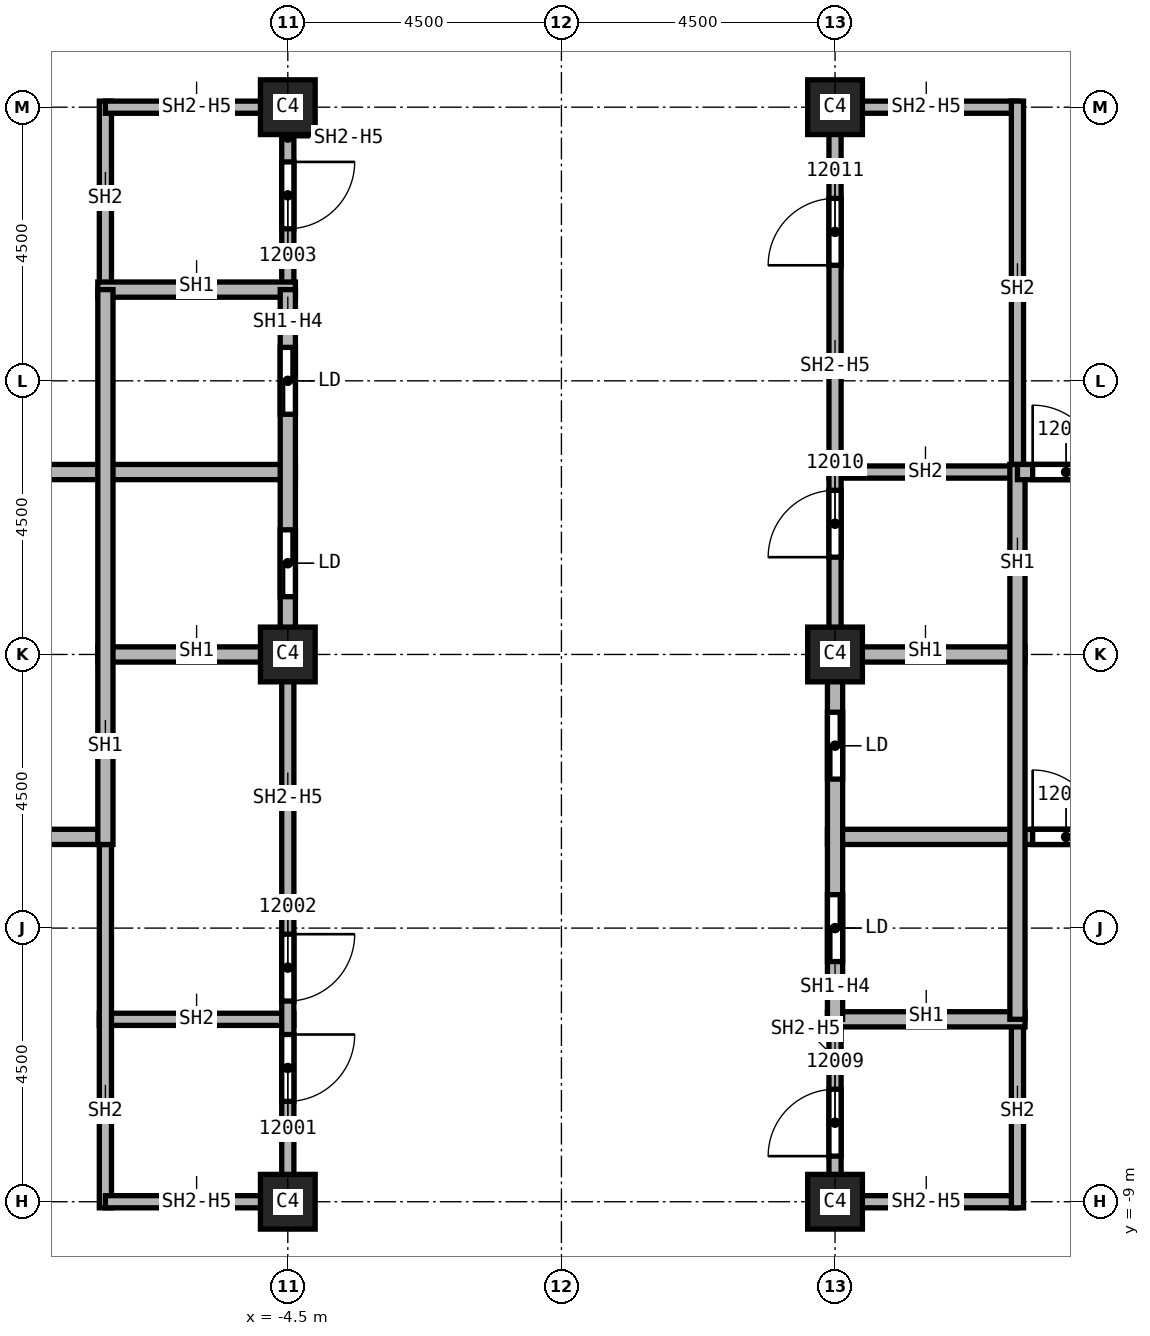
"""IFC4 building model, lengths in metres.
Left out: names, types, materials, properties, quantities, classifications, styles, units other than length and angle.
Written with IfcOpenShell. Run it as: python <this file> out.ifc"""

import sys

from ifc_helpers import new_model, si_unit, direction, frame, frame_2d, origin, origin_2d, place, context, subcontext, project, spatial, rectangle, extrude, element, fill, save


model = new_model("IFC4")
c1 = context("Model", 3, precision=1e-05, world=origin(), true_north=direction((0.0, 1.0)))
c2 = subcontext(c1, "Body", "Model", "MODEL_VIEW")
j1 = project(units=[si_unit("LENGTHUNIT", "METRE"), si_unit("PLANEANGLEUNIT", "RADIAN")], contexts=[c1])
p1 = place(None, origin())
s1 = spatial("IfcSite", under=j1, at=p1, CompositionType="ELEMENT")
p2 = place(p1, origin())
s2 = spatial("IfcBuilding", under=s1, at=p2, CompositionType="ELEMENT")
p3 = place(p2, frame((0.0, 0.0, 196.0)))
s3 = spatial("IfcBuildingStorey", under=s2, at=p3, CompositionType="ELEMENT", Elevation=196.0)
for number, where, z_axis, x_axis in (
    (1, (4.5, 0.0, 0.0), (0.0, 0.0, 1.0), (1.0, 0.0, 0.0)),
    (2, (4.5, 9.0, 0.0), (0.0, 0.0, 1.0), (1.0, 0.0, 0.0)),
    (3, (4.5, -9.0, 0.0), (0.0, 0.0, 1.0), (1.0, 0.0, 0.0)),
    (4, (-4.5, 0.0, 0.0), (0.0, 0.0, 1.0), (1.0, 0.0, 0.0)),
    (5, (-4.5, 9.0, 0.0), (0.0, 0.0, 1.0), (1.0, 0.0, 0.0)),
    (6, (-4.5, -9.0, 0.0), (0.0, 0.0, 1.0), (1.0, 0.0, 0.0)),
):
    element("IfcColumn", number, at=place(p3, frame(where, z_axis=z_axis, x_axis=x_axis)), inside=s3, PredefinedType="COLUMN", context=c2, shape_type="SweptSolid", body=[
        extrude(rectangle(XDim=0.9, YDim=0.9, at=origin_2d()), origin(), (0.0, 0.0, 1.0), 3.72),
    ])
p4 = place(p3, frame((-7.6, -6.0, 0.0), z_axis=(0.0, 0.0, 1.0), x_axis=(1.0, 0.0, 0.0)))
e7 = element("IfcWall", 7, at=p4, inside=s3, PredefinedType="SOLIDWALL", context=c2, shape_type="SweptSolid", body=[
    extrude(rectangle(XDim=3.2, YDim=0.2, at=frame_2d((1.6, 0.0))), origin(), (0.0, 0.0, 1.0), 3.72),
])
p5 = place(p3, frame((-7.5, -9.1, 0.0), z_axis=(0.0, 0.0, 1.0), x_axis=(0.0, 1.0, 0.0)))
e8 = element("IfcWall", 8, at=p5, inside=s3, PredefinedType="SOLIDWALL", context=c2, shape_type="SweptSolid", body=[
    extrude(rectangle(XDim=6.225, YDim=0.2, at=frame_2d((3.113, 0.0))), origin(), (0.0, 0.0, 1.0), 3.72),
])
p6 = place(p3, frame((-7.5, 6.0, 0.0), z_axis=(0.0, 0.0, 1.0), x_axis=(0.0, 1.0, 0.0)))
e9 = element("IfcWall", 9, at=p6, inside=s3, PredefinedType="SOLIDWALL", context=c2, shape_type="SweptSolid", body=[
    extrude(rectangle(XDim=3.1, YDim=0.2, at=frame_2d((1.55, 0.0))), origin(), (0.0, 0.0, 1.0), 3.72),
])
for number, where, z_axis, x_axis in (
    (10, (-7.5, 9.0, 0.0), (0.0, 0.0, 1.0), (1.0, 0.0, 0.0)),
    (11, (-4.5, -9.0, 0.0), (0.0, 0.0, 1.0), (-1.0, 0.0, 0.0)),
):
    element("IfcWall", number, at=place(p3, frame(where, z_axis=z_axis, x_axis=x_axis)), inside=s3, PredefinedType="SOLIDWALL", context=c2, shape_type="SweptSolid", body=[
        extrude(rectangle(XDim=3.0, YDim=0.2, at=frame_2d((1.5, 0.0))), origin(), (0.0, 0.0, 1.0), 2.958),
    ])
p7 = place(p3, frame((-4.5, 0.0, 0.0), z_axis=(0.0, 0.0, 1.0), x_axis=(0.0, -1.0, 0.0)))
e12 = element("IfcWall", 12, at=p7, inside=s3, PredefinedType="SOLIDWALL", context=c2, shape_type="SweptSolid", body=[
    extrude(rectangle(XDim=9.1, YDim=0.2, at=frame_2d((4.55, 0.0))), origin(), (0.0, 0.0, 1.0), 2.958),
])
p8 = place(p7, frame((6.25, 0.0, 0.0)))
e13 = element("IfcOpeningElement", 13, at=p8, cuts=e12, PredefinedType="OPENING", context=c2, shape_type="SweptSolid", body=[
    extrude(rectangle(XDim=1.1, YDim=2.1, at=frame_2d((0.55, 1.05))), frame((0.0, 0.1, 0.0), z_axis=(0.0, -1.0, 0.0), x_axis=(1.0, 0.0, 0.0)), (0.0, 0.0, 1.0), 0.2),
])
p9 = place(p7, frame((4.6, 0.0, 0.0)))
e14 = element("IfcOpeningElement", 14, at=p9, cuts=e12, PredefinedType="OPENING", context=c2, shape_type="SweptSolid", body=[
    extrude(rectangle(XDim=1.1, YDim=2.1, at=frame_2d((0.55, 1.05))), frame((0.0, 0.1, 0.0), z_axis=(0.0, -1.0, 0.0), x_axis=(1.0, 0.0, 0.0)), (0.0, 0.0, 1.0), 0.2),
])
p10 = place(p3, frame((-4.5, 9.1, 0.0), z_axis=(0.0, 0.0, 1.0), x_axis=(0.0, -1.0, 0.0)))
e15 = element("IfcWall", 15, at=p10, inside=s3, PredefinedType="SOLIDWALL", context=c2, shape_type="SweptSolid", body=[
    extrude(rectangle(XDim=3.1, YDim=0.2, at=frame_2d((1.55, 0.0))), origin(), (0.0, 0.0, 1.0), 2.958),
])
p11 = place(p10, frame((1.0, 0.0, 0.0)))
e16 = element("IfcOpeningElement", 16, at=p11, cuts=e15, PredefinedType="OPENING", context=c2, shape_type="SweptSolid", body=[
    extrude(rectangle(XDim=1.1, YDim=2.1, at=frame_2d((0.55, 1.05))), frame((0.0, 0.1, 0.0), z_axis=(0.0, -1.0, 0.0), x_axis=(1.0, 0.0, 0.0)), (0.0, 0.0, 1.0), 0.2),
])
p12 = place(p3, frame((4.4, 3.0, 0.0), z_axis=(0.0, 0.0, 1.0), x_axis=(1.0, 0.0, 0.0)))
e17 = element("IfcWall", 17, at=p12, inside=s3, PredefinedType="SOLIDWALL", context=c2, shape_type="SweptSolid", body=[
    extrude(rectangle(XDim=3.225, YDim=0.2, at=frame_2d((1.613, 0.0))), origin(), (0.0, 0.0, 1.0), 3.72),
])
p13 = place(p3, frame((4.5, -9.1, 0.0), z_axis=(0.0, 0.0, 1.0), x_axis=(0.0, 1.0, 0.0)))
e18 = element("IfcWall", 18, at=p13, inside=s3, PredefinedType="SOLIDWALL", context=c2, shape_type="SweptSolid", body=[
    extrude(rectangle(XDim=3.1, YDim=0.2, at=frame_2d((1.55, 0.0))), origin(), (0.0, 0.0, 1.0), 2.958),
])
p14 = place(p13, frame((0.85, 0.0, 0.0)))
e19 = element("IfcOpeningElement", 19, at=p14, cuts=e18, PredefinedType="OPENING", context=c2, shape_type="SweptSolid", body=[
    extrude(rectangle(XDim=1.1, YDim=2.1, at=frame_2d((0.55, 1.05))), frame((0.0, 0.1, 0.0), z_axis=(0.0, -1.0, 0.0), x_axis=(1.0, 0.0, 0.0)), (0.0, 0.0, 1.0), 0.2),
])
p15 = place(p3, frame((4.5, 0.0, 0.0), z_axis=(0.0, 0.0, 1.0), x_axis=(0.0, 1.0, 0.0)))
e20 = element("IfcWall", 20, at=p15, inside=s3, PredefinedType="SOLIDWALL", context=c2, shape_type="SweptSolid", body=[
    extrude(rectangle(XDim=9.1, YDim=0.2, at=frame_2d((4.55, 0.0))), origin(), (0.0, 0.0, 1.0), 2.958),
])
p16 = place(p15, frame((1.6, 0.0, 0.0)))
e21 = element("IfcOpeningElement", 21, at=p16, cuts=e20, PredefinedType="OPENING", context=c2, shape_type="SweptSolid", body=[
    extrude(rectangle(XDim=1.1, YDim=2.1, at=frame_2d((0.55, 1.05))), frame((0.0, 0.1, 0.0), z_axis=(0.0, -1.0, 0.0), x_axis=(1.0, 0.0, 0.0)), (0.0, 0.0, 1.0), 0.2),
])
p17 = place(p15, frame((6.4, 0.0, 0.0)))
e22 = element("IfcOpeningElement", 22, at=p17, cuts=e20, PredefinedType="OPENING", context=c2, shape_type="SweptSolid", body=[
    extrude(rectangle(XDim=1.1, YDim=2.1, at=frame_2d((0.55, 1.05))), frame((0.0, 0.1, 0.0), z_axis=(0.0, -1.0, 0.0), x_axis=(1.0, 0.0, 0.0)), (0.0, 0.0, 1.0), 0.2),
])
for number, where, z_axis, x_axis in (
    (23, (4.5, 9.0, 0.0), (0.0, 0.0, 1.0), (1.0, 0.0, 0.0)),
    (24, (7.5, -9.0, 0.0), (0.0, 0.0, 1.0), (-1.0, 0.0, 0.0)),
):
    element("IfcWall", number, at=place(p3, frame(where, z_axis=z_axis, x_axis=x_axis)), inside=s3, PredefinedType="SOLIDWALL", context=c2, shape_type="SweptSolid", body=[
        extrude(rectangle(XDim=3.0, YDim=0.2, at=frame_2d((1.5, 0.0))), origin(), (0.0, 0.0, 1.0), 2.958),
    ])
p18 = place(p3, frame((7.5, -6.0, 0.0), z_axis=(0.0, 0.0, 1.0), x_axis=(0.0, -1.0, 0.0)))
e25 = element("IfcWall", 25, at=p18, inside=s3, PredefinedType="SOLIDWALL", context=c2, shape_type="SweptSolid", body=[
    extrude(rectangle(XDim=3.1, YDim=0.2, at=frame_2d((1.55, 0.0))), origin(), (0.0, 0.0, 1.0), 3.72),
])
p19 = place(p3, frame((7.5, 9.1, 0.0), z_axis=(0.0, 0.0, 1.0), x_axis=(0.0, -1.0, 0.0)))
e26 = element("IfcWall", 26, at=p19, inside=s3, PredefinedType="SOLIDWALL", context=c2, shape_type="SweptSolid", body=[
    extrude(rectangle(XDim=6.225, YDim=0.2, at=frame_2d((3.113, 0.0))), origin(), (0.0, 0.0, 1.0), 3.72),
])
p20 = place(p3, frame((-13.625, 3.0, 0.0), z_axis=(0.0, 0.0, 1.0), x_axis=(1.0, 0.0, 0.0)))
e27 = element("IfcWall", 27, at=p20, inside=s3, PredefinedType="SOLIDWALL", context=c2, shape_type="SweptSolid", body=[
    extrude(rectangle(XDim=9.25, YDim=0.25, at=frame_2d((4.625, 0.0))), origin(), (0.0, 0.0, 1.0), 3.72),
])
p21 = place(p20, frame((3.25, 0.0, 0.0)))
e28 = element("IfcOpeningElement", 28, at=p21, cuts=e27, PredefinedType="OPENING", context=c2, shape_type="SweptSolid", body=[
    extrude(rectangle(XDim=1.1, YDim=2.1, at=frame_2d((0.55, 1.05))), frame((0.0, 0.125, 0.0), z_axis=(0.0, -1.0, 0.0), x_axis=(1.0, 0.0, 0.0)), (0.0, 0.0, 1.0), 0.25),
])
p22 = place(p3, frame((-13.625, -3.0, 0.0), z_axis=(0.0, 0.0, 1.0), x_axis=(1.0, 0.0, 0.0)))
e29 = element("IfcWall", 29, at=p22, inside=s3, PredefinedType="SOLIDWALL", context=c2, shape_type="SweptSolid", body=[
    extrude(rectangle(XDim=6.125, YDim=0.25, at=frame_2d((3.062, 0.0))), origin(), (0.0, 0.0, 1.0), 3.72),
])
p23 = place(p22, frame((3.25, 0.0, 0.0)))
e30 = element("IfcOpeningElement", 30, at=p23, cuts=e29, PredefinedType="OPENING", context=c2, shape_type="SweptSolid", body=[
    extrude(rectangle(XDim=1.1, YDim=2.1, at=frame_2d((0.55, 1.05))), frame((0.0, 0.125, 0.0), z_axis=(0.0, -1.0, 0.0), x_axis=(1.0, 0.0, 0.0)), (0.0, 0.0, 1.0), 0.25),
])
for number, where, z_axis, x_axis in (
    (31, (-7.625, 0.0, 0.0), (0.0, 0.0, 1.0), (1.0, 0.0, 0.0)),
    (32, (-7.625, 6.0, 0.0), (0.0, 0.0, 1.0), (1.0, 0.0, 0.0)),
):
    element("IfcWall", number, at=place(p3, frame(where, z_axis=z_axis, x_axis=x_axis)), inside=s3, PredefinedType="SOLIDWALL", context=c2, shape_type="SweptSolid", body=[
        extrude(rectangle(XDim=3.25, YDim=0.25, at=frame_2d((1.625, 0.0))), origin(), (0.0, 0.0, 1.0), 3.72),
    ])
p24 = place(p3, frame((-7.5, -3.125, 0.0), z_axis=(0.0, 0.0, 1.0), x_axis=(0.0, 1.0, 0.0)))
e33 = element("IfcWall", 33, at=p24, inside=s3, PredefinedType="SOLIDWALL", context=c2, shape_type="SweptSolid", body=[
    extrude(rectangle(XDim=9.125, YDim=0.25, at=frame_2d((4.562, 0.0))), origin(), (0.0, 0.0, 1.0), 3.72),
])
p25 = place(p3, frame((-4.5, 6.0, 0.0), z_axis=(0.0, 0.0, 1.0), x_axis=(0.0, -1.0, 0.0)))
e34 = element("IfcWall", 34, at=p25, inside=s3, PredefinedType="SOLIDWALL", context=c2, shape_type="SweptSolid", body=[
    extrude(rectangle(XDim=6.0, YDim=0.25, at=frame_2d((3.0, 0.0))), origin(), (0.0, 0.0, 1.0), 2.958),
])
p26 = place(p25, frame((3.95, 0.0, 0.0)))
e35 = element("IfcOpeningElement", 35, at=p26, cuts=e34, PredefinedType="OPENING", context=c2, shape_type="SweptSolid", body=[
    extrude(rectangle(XDim=1.1, YDim=2.1, at=frame_2d((0.55, 1.05))), frame((0.0, 0.125, 0.0), z_axis=(0.0, -1.0, 0.0), x_axis=(1.0, 0.0, 0.0)), (0.0, 0.0, 1.0), 0.25),
])
p27 = place(p25, frame((0.95, 0.0, 0.0)))
e36 = element("IfcOpeningElement", 36, at=p27, cuts=e34, PredefinedType="OPENING", context=c2, shape_type="SweptSolid", body=[
    extrude(rectangle(XDim=1.1, YDim=2.1, at=frame_2d((0.55, 1.05))), frame((0.0, 0.125, 0.0), z_axis=(0.0, -1.0, 0.0), x_axis=(1.0, 0.0, 0.0)), (0.0, 0.0, 1.0), 0.25),
])
p28 = place(p3, frame((4.375, -6.0, 0.0), z_axis=(0.0, 0.0, 1.0), x_axis=(1.0, 0.0, 0.0)))
e37 = element("IfcWall", 37, at=p28, inside=s3, PredefinedType="SOLIDWALL", context=c2, shape_type="SweptSolid", body=[
    extrude(rectangle(XDim=3.25, YDim=0.25, at=frame_2d((1.625, 0.0))), origin(), (0.0, 0.0, 1.0), 3.72),
])
p29 = place(p3, frame((4.375, -3.0, 0.0), z_axis=(0.0, 0.0, 1.0), x_axis=(1.0, 0.0, 0.0)))
e38 = element("IfcWall", 38, at=p29, inside=s3, PredefinedType="SOLIDWALL", context=c2, shape_type="SweptSolid", body=[
    extrude(rectangle(XDim=9.25, YDim=0.25, at=frame_2d((4.625, 0.0))), origin(), (0.0, 0.0, 1.0), 3.72),
])
p30 = place(p29, frame((3.375, 0.0, 0.0)))
e39 = element("IfcOpeningElement", 39, at=p30, cuts=e38, PredefinedType="OPENING", context=c2, shape_type="SweptSolid", body=[
    extrude(rectangle(XDim=1.1, YDim=2.1, at=frame_2d((0.55, 1.05))), frame((0.0, 0.125, 0.0), z_axis=(0.0, -1.0, 0.0), x_axis=(1.0, 0.0, 0.0)), (0.0, 0.0, 1.0), 0.25),
])
p31 = place(p3, frame((4.375, 0.0, 0.0), z_axis=(0.0, 0.0, 1.0), x_axis=(1.0, 0.0, 0.0)))
e40 = element("IfcWall", 40, at=p31, inside=s3, PredefinedType="SOLIDWALL", context=c2, shape_type="SweptSolid", body=[
    extrude(rectangle(XDim=3.25, YDim=0.25, at=frame_2d((1.625, 0.0))), origin(), (0.0, 0.0, 1.0), 3.72),
])
p32 = place(p3, frame((4.5, -6.0, 0.0), z_axis=(0.0, 0.0, 1.0), x_axis=(0.0, 1.0, 0.0)))
e41 = element("IfcWall", 41, at=p32, inside=s3, PredefinedType="SOLIDWALL", context=c2, shape_type="SweptSolid", body=[
    extrude(rectangle(XDim=6.0, YDim=0.25, at=frame_2d((3.0, 0.0))), origin(), (0.0, 0.0, 1.0), 2.958),
])
p33 = place(p32, frame((0.95, 0.0, 0.0)))
e42 = element("IfcOpeningElement", 42, at=p33, cuts=e41, PredefinedType="OPENING", context=c2, shape_type="SweptSolid", body=[
    extrude(rectangle(XDim=1.1, YDim=2.1, at=frame_2d((0.55, 1.05))), frame((0.0, 0.125, 0.0), z_axis=(0.0, -1.0, 0.0), x_axis=(1.0, 0.0, 0.0)), (0.0, 0.0, 1.0), 0.25),
])
p34 = place(p32, frame((3.95, 0.0, 0.0)))
e43 = element("IfcOpeningElement", 43, at=p34, cuts=e41, PredefinedType="OPENING", context=c2, shape_type="SweptSolid", body=[
    extrude(rectangle(XDim=1.1, YDim=2.1, at=frame_2d((0.55, 1.05))), frame((0.0, 0.125, 0.0), z_axis=(0.0, -1.0, 0.0), x_axis=(1.0, 0.0, 0.0)), (0.0, 0.0, 1.0), 0.25),
])
p35 = place(p3, frame((7.5, 3.125, 0.0), z_axis=(0.0, 0.0, 1.0), x_axis=(0.0, -1.0, 0.0)))
e44 = element("IfcWall", 44, at=p35, inside=s3, PredefinedType="SOLIDWALL", context=c2, shape_type="SweptSolid", body=[
    extrude(rectangle(XDim=9.125, YDim=0.25, at=frame_2d((4.562, 0.0))), origin(), (0.0, 0.0, 1.0), 3.72),
])
p36 = place(p3, frame((7.5, 3.0, 0.0), z_axis=(0.0, 0.0, 1.0), x_axis=(1.0, 0.0, 0.0)))
e45 = element("IfcWall", 45, at=p36, inside=s3, PredefinedType="SOLIDWALL", context=c2, shape_type="SweptSolid", body=[
    extrude(rectangle(XDim=6.125, YDim=0.25, at=frame_2d((3.062, 0.0))), origin(), (0.0, 0.0, 1.0), 3.72),
])
p37 = place(p36, frame((0.25, 0.0, 0.0)))
e46 = element("IfcOpeningElement", 46, at=p37, cuts=e45, PredefinedType="OPENING", context=c2, shape_type="SweptSolid", body=[
    extrude(rectangle(XDim=1.1, YDim=2.1, at=frame_2d((0.55, 1.05))), frame((0.0, 0.125, 0.0), z_axis=(0.0, -1.0, 0.0), x_axis=(1.0, 0.0, 0.0)), (0.0, 0.0, 1.0), 0.25),
])
p38 = place(p8, origin())
e47 = element("IfcDoor", 47, at=p38, inside=s3, OperationType="SINGLE_SWING_RIGHT", PredefinedType="DOOR", context=c2, shape_type="SweptSolid", body=[
    extrude(rectangle(XDim=1.1, YDim=2.1, at=frame_2d((0.55, 1.05))), frame((0.0, 0.025, 0.0), z_axis=(0.0, -1.0, 0.0), x_axis=(1.0, 0.0, 0.0)), (0.0, 0.0, 1.0), 0.05),
])
fill(e13, e47)
p39 = place(p9, origin())
e48 = element("IfcDoor", 48, at=p39, inside=s3, OperationType="SINGLE_SWING_LEFT", PredefinedType="DOOR", context=c2, shape_type="SweptSolid", body=[
    extrude(rectangle(XDim=1.1, YDim=2.1, at=frame_2d((0.55, 1.05))), frame((0.0, 0.025, 0.0), z_axis=(0.0, -1.0, 0.0), x_axis=(1.0, 0.0, 0.0)), (0.0, 0.0, 1.0), 0.05),
])
fill(e14, e48)
p40 = place(p11, origin())
e49 = element("IfcDoor", 49, at=p40, inside=s3, OperationType="SINGLE_SWING_RIGHT", PredefinedType="DOOR", context=c2, shape_type="SweptSolid", body=[
    extrude(rectangle(XDim=1.1, YDim=2.1, at=frame_2d((0.55, 1.05))), frame((0.0, 0.025, 0.0), z_axis=(0.0, -1.0, 0.0), x_axis=(1.0, 0.0, 0.0)), (0.0, 0.0, 1.0), 0.05),
])
fill(e16, e49)
p41 = place(p14, origin())
e50 = element("IfcDoor", 50, at=p41, inside=s3, OperationType="SINGLE_SWING_RIGHT", PredefinedType="DOOR", context=c2, shape_type="SweptSolid", body=[
    extrude(rectangle(XDim=1.1, YDim=2.1, at=frame_2d((0.55, 1.05))), frame((0.0, 0.025, 0.0), z_axis=(0.0, -1.0, 0.0), x_axis=(1.0, 0.0, 0.0)), (0.0, 0.0, 1.0), 0.05),
])
fill(e19, e50)
p42 = place(p16, origin())
e51 = element("IfcDoor", 51, at=p42, inside=s3, OperationType="SINGLE_SWING_LEFT", PredefinedType="DOOR", context=c2, shape_type="SweptSolid", body=[
    extrude(rectangle(XDim=1.1, YDim=2.1, at=frame_2d((0.55, 1.05))), frame((0.0, 0.025, 0.0), z_axis=(0.0, -1.0, 0.0), x_axis=(1.0, 0.0, 0.0)), (0.0, 0.0, 1.0), 0.05),
])
fill(e21, e51)
p43 = place(p17, origin())
e52 = element("IfcDoor", 52, at=p43, inside=s3, OperationType="SINGLE_SWING_RIGHT", PredefinedType="DOOR", context=c2, shape_type="SweptSolid", body=[
    extrude(rectangle(XDim=1.1, YDim=2.1, at=frame_2d((0.55, 1.05))), frame((0.0, 0.025, 0.0), z_axis=(0.0, -1.0, 0.0), x_axis=(1.0, 0.0, 0.0)), (0.0, 0.0, 1.0), 0.05),
])
fill(e22, e52)
p44 = place(p30, origin())
e53 = element("IfcDoor", 53, at=p44, inside=s3, OperationType="SINGLE_SWING_LEFT", PredefinedType="DOOR", context=c2, shape_type="SweptSolid", body=[
    extrude(rectangle(XDim=1.1, YDim=2.1, at=frame_2d((0.55, 1.05))), frame((0.0, 0.025, 0.0), z_axis=(0.0, -1.0, 0.0), x_axis=(1.0, 0.0, 0.0)), (0.0, 0.0, 1.0), 0.05),
])
fill(e39, e53)
p45 = place(p37, origin())
e54 = element("IfcDoor", 54, at=p45, inside=s3, OperationType="SINGLE_SWING_RIGHT", PredefinedType="DOOR", context=c2, shape_type="SweptSolid", body=[
    extrude(rectangle(XDim=1.1, YDim=2.1, at=frame_2d((0.55, 1.05))), frame((0.0, 0.025, 0.0), z_axis=(0.0, -1.0, 0.0), x_axis=(1.0, 0.0, 0.0)), (0.0, 0.0, 1.0), 0.05),
])
fill(e46, e54)
p46 = place(p26, origin())
e55 = element("IfcDoor", 55, at=p46, inside=s3, OperationType="SLIDING_TO_LEFT", PredefinedType="DOOR", context=c2, shape_type="SweptSolid", body=[
    extrude(rectangle(XDim=1.1, YDim=2.1, at=frame_2d((0.55, 1.05))), frame((0.0, 0.025, 0.0), z_axis=(0.0, -1.0, 0.0), x_axis=(1.0, 0.0, 0.0)), (0.0, 0.0, 1.0), 0.05),
])
fill(e35, e55)
p47 = place(p27, origin())
e56 = element("IfcDoor", 56, at=p47, inside=s3, OperationType="SLIDING_TO_LEFT", PredefinedType="DOOR", context=c2, shape_type="SweptSolid", body=[
    extrude(rectangle(XDim=1.1, YDim=2.1, at=frame_2d((0.55, 1.05))), frame((0.0, 0.025, 0.0), z_axis=(0.0, -1.0, 0.0), x_axis=(1.0, 0.0, 0.0)), (0.0, 0.0, 1.0), 0.05),
])
fill(e36, e56)
p48 = place(p33, origin())
e57 = element("IfcDoor", 57, at=p48, inside=s3, OperationType="SLIDING_TO_LEFT", PredefinedType="DOOR", context=c2, shape_type="SweptSolid", body=[
    extrude(rectangle(XDim=1.1, YDim=2.1, at=frame_2d((0.55, 1.05))), frame((0.0, 0.025, 0.0), z_axis=(0.0, -1.0, 0.0), x_axis=(1.0, 0.0, 0.0)), (0.0, 0.0, 1.0), 0.05),
])
fill(e42, e57)
p49 = place(p34, origin())
e58 = element("IfcDoor", 58, at=p49, inside=s3, OperationType="SLIDING_TO_LEFT", PredefinedType="DOOR", context=c2, shape_type="SweptSolid", body=[
    extrude(rectangle(XDim=1.1, YDim=2.1, at=frame_2d((0.55, 1.05))), frame((0.0, 0.025, 0.0), z_axis=(0.0, -1.0, 0.0), x_axis=(1.0, 0.0, 0.0)), (0.0, 0.0, 1.0), 0.05),
])
fill(e43, e58)
save(model, sys.argv[1])
